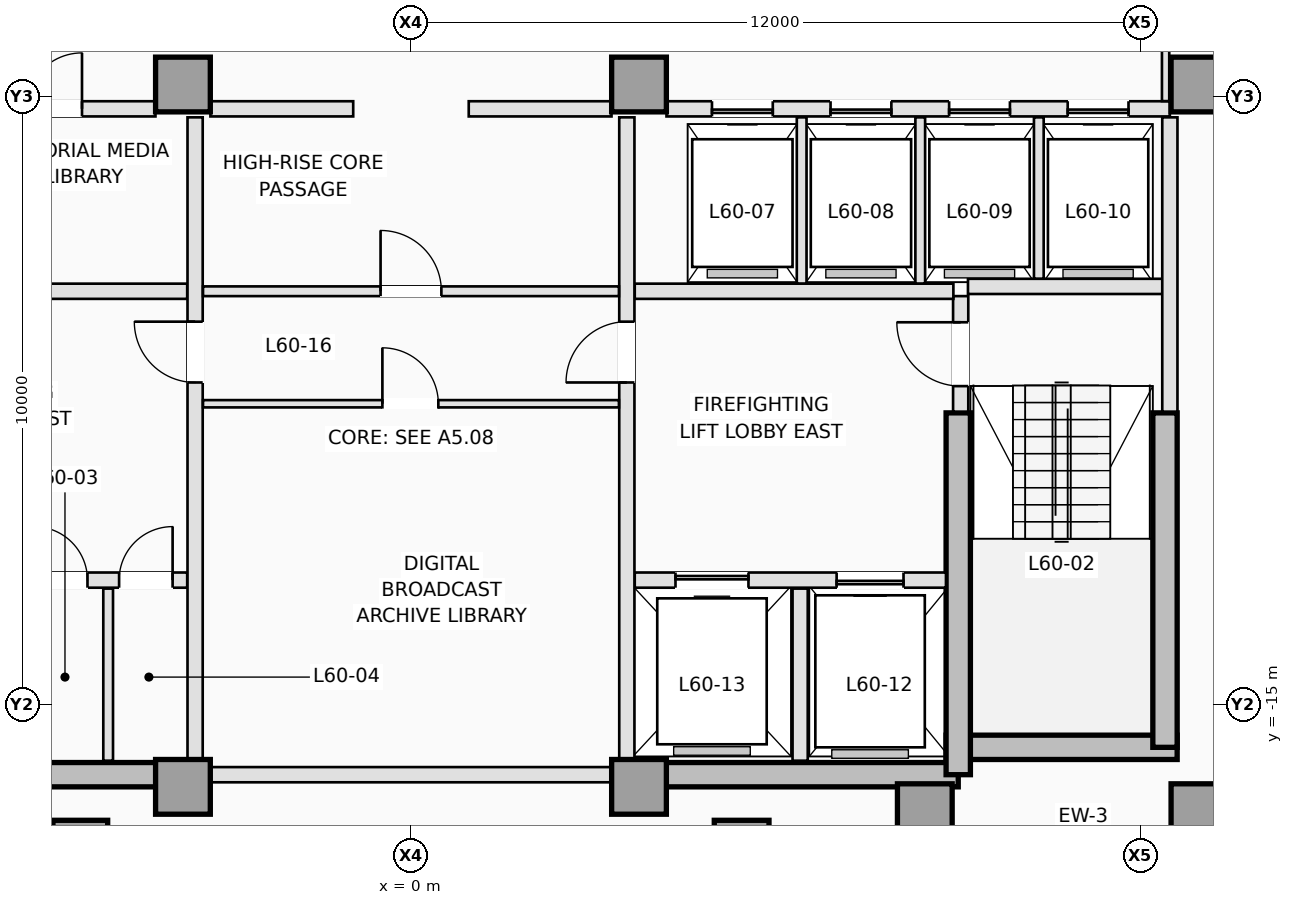
"""IFC4 building model, lengths in metres.
Left out: names, types, materials, properties, quantities, classifications, styles, units other than length and angle.
Written with IfcOpenShell. Run it as: python <this file> out.ifc"""

import sys

from ifc_helpers import new_model, si_unit, direction, frame, frame_2d, origin, origin_2d, place, context, subcontext, project, spatial, rectangle, extrude, element, fill, save


model = new_model("IFC4")
c1 = context("Model", 3, precision=1e-05, world=origin(), true_north=direction((0.0, 1.0)))
c2 = subcontext(c1, "Body", "Model", "MODEL_VIEW")
j1 = project(units=[si_unit("LENGTHUNIT", "METRE"), si_unit("PLANEANGLEUNIT", "RADIAN")], contexts=[c1])
p1 = place(None, origin())
s1 = spatial("IfcSite", under=j1, at=p1, CompositionType="ELEMENT")
p2 = place(p1, origin())
s2 = spatial("IfcBuilding", under=s1, at=p2, CompositionType="ELEMENT")
p3 = place(p2, frame((0.0, 0.0, 218.4)))
s3 = spatial("IfcBuildingStorey", under=s2, at=p3, CompositionType="ELEMENT", Elevation=218.4)
for number, where, z_axis, x_axis in (
    (1, (-9.0, -16.15, 0.0), (0.0, 0.0, 1.0), (1.0, 0.0, 0.0)),
    (2, (3.75, -16.15, 0.0), (0.0, 0.0, 1.0), (1.0, 0.0, 0.0)),
):
    element("IfcWall", number, at=place(p3, frame(where, z_axis=z_axis, x_axis=x_axis)), inside=s3, PredefinedType="SHEAR", context=c2, shape_type="SweptSolid", body=[
        extrude(rectangle(XDim=5.25, YDim=0.4, at=frame_2d((2.625, 0.0))), origin(), (0.0, 0.0, 1.0), 3.5),
    ])
p4 = place(p3, frame((8.8, -15.7, 0.0), z_axis=(0.0, 0.0, 1.0), x_axis=(1.0, 0.0, 0.0)))
e3 = element("IfcWall", 3, at=p4, inside=s3, PredefinedType="SHEAR", context=c2, shape_type="SweptSolid", body=[
    extrude(rectangle(XDim=3.8, YDim=0.4, at=frame_2d((1.9, 0.0))), origin(), (0.0, 0.0, 1.0), 3.5),
])
p5 = place(p3, frame((12.4, -15.7, 0.0), z_axis=(0.0, 0.0, 1.0), x_axis=(0.0, 1.0, 0.0)))
e4 = element("IfcWall", 4, at=p5, inside=s3, PredefinedType="SHEAR", context=c2, shape_type="SweptSolid", body=[
    extrude(rectangle(XDim=5.5, YDim=0.4, at=frame_2d((2.75, 0.0))), origin(), (0.0, 0.0, 1.0), 3.5),
])
p6 = place(p3, frame((9.0, -16.15, 0.0), z_axis=(0.0, 0.0, 1.0), x_axis=(0.0, 1.0, 0.0)))
e5 = element("IfcWall", 5, at=p6, inside=s3, PredefinedType="SHEAR", context=c2, shape_type="SweptSolid", body=[
    extrude(rectangle(XDim=5.95, YDim=0.4, at=frame_2d((2.975, 0.0))), origin(), (0.0, 0.0, 1.0), 3.5),
])
for number, where, z_axis, x_axis in (
    (6, (-3.75, -16.35, 0.0), (0.0, 0.0, 1.0), (1.0, 0.0, 0.0)),
    (7, (3.75, -16.35, 0.0), (0.0, 0.0, 1.0), (1.0, 0.0, 0.0)),
    (8, (8.45, -16.75, 0.0), (0.0, 0.0, 1.0), (1.0, 0.0, 0.0)),
    (9, (12.95, -16.75, 0.0), (0.0, 0.0, 1.0), (1.0, 0.0, 0.0)),
    (10, (-3.75, -4.8, 0.0), (0.0, 0.0, 1.0), (1.0, 0.0, 0.0)),
    (11, (3.75, -4.8, 0.0), (0.0, 0.0, 1.0), (1.0, 0.0, 0.0)),
    (12, (12.95, -4.8, 0.0), (0.0, 0.0, 1.0), (1.0, 0.0, 0.0)),
    (13, (-5.438, -17.35, 0.0), (0.0, 0.0, 1.0), (0.0, 1.0, 0.0)),
    (14, (5.438, -17.35, 0.0), (0.0, 0.0, 1.0), (0.0, 1.0, 0.0)),
):
    element("IfcColumn", number, at=place(p3, frame(where, z_axis=z_axis, x_axis=x_axis)), inside=s3, PredefinedType="COLUMN", context=c2, shape_type="SweptSolid", body=[
        extrude(rectangle(XDim=0.9, YDim=0.9, at=origin_2d()), origin(), (0.0, 0.0, 1.0), 3.5),
    ])
p7 = place(p3, frame((9.04, -10.18, 0.0), z_axis=(0.0, 0.0, 1.0), x_axis=(0.0, 1.0, 0.0)))
e15 = element("IfcWall", 15, at=p7, inside=s3, PredefinedType="PARTITIONING", context=c2, shape_type="SweptSolid", body=[
    extrude(rectangle(XDim=1.9, YDim=0.25, at=frame_2d((0.95, 0.0))), origin(), (0.0, 0.0, 1.0), 3.25),
])
p8 = place(p7, frame((0.42, 0.0, 0.0)))
e16 = element("IfcOpeningElement", 16, at=p8, cuts=e15, PredefinedType="OPENING", context=c2, shape_type="SweptSolid", body=[
    extrude(rectangle(XDim=1.05, YDim=2.15, at=frame_2d((0.525, 1.075))), frame((0.0, 0.135, 0.0), z_axis=(0.0, -1.0, 0.0), x_axis=(1.0, 0.0, 0.0)), (0.0, 0.0, 1.0), 0.27),
])
p9 = place(p3, frame((9.16, -8.12, 0.0), z_axis=(0.0, 0.0, 1.0), x_axis=(1.0, 0.0, 0.0)))
e17 = element("IfcWall", 17, at=p9, inside=s3, PredefinedType="PARTITIONING", context=c2, shape_type="SweptSolid", body=[
    extrude(rectangle(XDim=3.22, YDim=0.25, at=frame_2d((1.61, 0.0))), origin(), (0.0, 0.0, 1.0), 3.25),
])
p10 = place(p3, frame((12.48, -10.18, 0.0), z_axis=(0.0, 0.0, 1.0), x_axis=(0.0, 1.0, 0.0)))
e18 = element("IfcWall", 18, at=p10, inside=s3, PredefinedType="PARTITIONING", context=c2, shape_type="SweptSolid", body=[
    extrude(rectangle(XDim=4.84, YDim=0.25, at=frame_2d((2.42, 0.0))), origin(), (0.0, 0.0, 1.0), 3.25),
])
p11 = place(p3, frame((-8.798, -12.95, 0.0), z_axis=(0.0, 0.0, 1.0), x_axis=(1.0, 0.0, 0.0)))
e19 = element("IfcWall", 19, at=p11, inside=s3, PredefinedType="PARTITIONING", context=c2, shape_type="SweptSolid", body=[
    extrude(rectangle(XDim=5.118, YDim=0.25, at=frame_2d((2.559, 0.0))), origin(), (0.0, 0.0, 1.0), 3.25),
])
p12 = place(p11, frame((0.698, 0.0, 0.0)))
e20 = element("IfcOpeningElement", 20, at=p12, cuts=e19, PredefinedType="OPENING", context=c2, shape_type="SweptSolid", body=[
    extrude(rectangle(XDim=1.1, YDim=2.15, at=frame_2d((0.55, 1.075))), frame((0.0, 0.135, 0.0), z_axis=(0.0, -1.0, 0.0), x_axis=(1.0, 0.0, 0.0)), (0.0, 0.0, 1.0), 0.27),
])
p13 = place(p11, frame((2.598, 0.0, 0.0)))
e21 = element("IfcOpeningElement", 21, at=p13, cuts=e19, PredefinedType="OPENING", context=c2, shape_type="SweptSolid", body=[
    extrude(rectangle(XDim=0.88, YDim=2.1, at=frame_2d((0.44, 1.05))), frame((0.0, 0.135, 0.0), z_axis=(0.0, -1.0, 0.0), x_axis=(1.0, 0.0, 0.0)), (0.0, 0.0, 1.0), 0.27),
])
p14 = place(p11, frame((3.998, 0.0, 0.0)))
e22 = element("IfcOpeningElement", 22, at=p14, cuts=e19, PredefinedType="OPENING", context=c2, shape_type="SweptSolid", body=[
    extrude(rectangle(XDim=0.88, YDim=2.1, at=frame_2d((0.44, 1.05))), frame((0.0, 0.135, 0.0), z_axis=(0.0, -1.0, 0.0), x_axis=(1.0, 0.0, 0.0)), (0.0, 0.0, 1.0), 0.27),
])
p15 = place(p3, frame((3.68, -12.95, 0.0), z_axis=(0.0, 0.0, 1.0), x_axis=(1.0, 0.0, 0.0)))
e23 = element("IfcWall", 23, at=p15, inside=s3, PredefinedType="PARTITIONING", context=c2, shape_type="SweptSolid", body=[
    extrude(rectangle(XDim=5.118, YDim=0.25, at=frame_2d((2.559, 0.0))), origin(), (0.0, 0.0, 1.0), 3.25),
])
p16 = place(p15, frame((3.32, 0.0, 0.0)))
e24 = element("IfcOpeningElement", 24, at=p16, cuts=e23, PredefinedType="OPENING", context=c2, shape_type="SweptSolid", body=[
    extrude(rectangle(XDim=1.1, YDim=2.15, at=frame_2d((0.55, 1.075))), frame((0.0, 0.135, 0.0), z_axis=(0.0, -1.0, 0.0), x_axis=(1.0, 0.0, 0.0)), (0.0, 0.0, 1.0), 0.27),
])
p17 = place(p15, frame((0.67, 0.0, 0.0)))
e25 = element("IfcOpeningElement", 25, at=p17, cuts=e23, PredefinedType="OPENING", context=c2, shape_type="SweptSolid", body=[
    extrude(rectangle(XDim=1.2, YDim=2.15, at=frame_2d((0.6, 1.075))), frame((0.0, 0.135, 0.0), z_axis=(0.0, -1.0, 0.0), x_axis=(1.0, 0.0, 0.0)), (0.0, 0.0, 1.0), 0.27),
])
p18 = place(p3, frame((-4.98, -15.92, 0.0), z_axis=(0.0, 0.0, 1.0), x_axis=(0.0, 1.0, 0.0)))
e26 = element("IfcWall", 26, at=p18, inside=s3, PredefinedType="PARTITIONING", context=c2, shape_type="SweptSolid", body=[
    extrude(rectangle(XDim=2.83, YDim=0.16, at=frame_2d((1.415, 0.0))), origin(), (0.0, 0.0, 1.0), 3.25),
])
p19 = place(p3, frame((6.4, -15.92, 0.0), z_axis=(0.0, 0.0, 1.0), x_axis=(0.0, 1.0, 0.0)))
e27 = element("IfcWall", 27, at=p19, inside=s3, PredefinedType="PARTITIONING", context=c2, shape_type="SweptSolid", body=[
    extrude(rectangle(XDim=2.83, YDim=0.25, at=frame_2d((1.415, 0.0))), origin(), (0.0, 0.0, 1.0), 3.25),
])
for number, where, z_axis, x_axis in (
    (28, (-8.92, -8.2, 0.0), (0.0, 0.0, 1.0), (1.0, 0.0, 0.0)),
    (29, (3.68, -8.2, 0.0), (0.0, 0.0, 1.0), (1.0, 0.0, 0.0)),
):
    element("IfcWall", number, at=place(p3, frame(where, z_axis=z_axis, x_axis=x_axis)), inside=s3, PredefinedType="PARTITIONING", context=c2, shape_type="SweptSolid", body=[
        extrude(rectangle(XDim=5.24, YDim=0.25, at=frame_2d((2.62, 0.0))), origin(), (0.0, 0.0, 1.0), 3.25),
    ])
p20 = place(p3, frame((-3.55, -15.898, 0.0), z_axis=(0.0, 0.0, 1.0), x_axis=(0.0, 1.0, 0.0)))
e30 = element("IfcWall", 30, at=p20, inside=s3, PredefinedType="PARTITIONING", context=c2, shape_type="SweptSolid", body=[
    extrude(rectangle(XDim=10.558, YDim=0.25, at=frame_2d((5.279, 0.0))), origin(), (0.0, 0.0, 1.0), 3.25),
])
p21 = place(p20, frame((6.198, 0.0, 0.0)))
e31 = element("IfcOpeningElement", 31, at=p21, cuts=e30, PredefinedType="OPENING", context=c2, shape_type="SweptSolid", body=[
    extrude(rectangle(XDim=1.0, YDim=2.15, at=frame_2d((0.5, 1.075))), frame((0.0, 0.135, 0.0), z_axis=(0.0, -1.0, 0.0), x_axis=(1.0, 0.0, 0.0)), (0.0, 0.0, 1.0), 0.27),
])
p22 = place(p3, frame((3.55, -15.898, 0.0), z_axis=(0.0, 0.0, 1.0), x_axis=(0.0, 1.0, 0.0)))
e32 = element("IfcWall", 32, at=p22, inside=s3, PredefinedType="PARTITIONING", context=c2, shape_type="SweptSolid", body=[
    extrude(rectangle(XDim=10.558, YDim=0.25, at=frame_2d((5.279, 0.0))), origin(), (0.0, 0.0, 1.0), 3.25),
])
p23 = place(p22, frame((6.198, 0.0, 0.0)))
e33 = element("IfcOpeningElement", 33, at=p23, cuts=e32, PredefinedType="OPENING", context=c2, shape_type="SweptSolid", body=[
    extrude(rectangle(XDim=1.0, YDim=2.15, at=frame_2d((0.5, 1.075))), frame((0.0, 0.135, 0.0), z_axis=(0.0, -1.0, 0.0), x_axis=(1.0, 0.0, 0.0)), (0.0, 0.0, 1.0), 0.27),
])
p24 = place(p3, frame((-12.48, -5.2, 0.0), z_axis=(0.0, 0.0, 1.0), x_axis=(1.0, 0.0, 0.0)))
e34 = element("IfcWall", 34, at=p24, inside=s3, PredefinedType="PARTITIONING", context=c2, shape_type="SweptSolid", body=[
    extrude(rectangle(XDim=8.278, YDim=0.25, at=frame_2d((4.139, 0.0))), origin(), (0.0, 0.0, 1.0), 3.25),
])
p25 = place(p24, frame((3.05, 0.0, 0.0)))
e35 = element("IfcOpeningElement", 35, at=p25, cuts=e34, PredefinedType="OPENING", context=c2, shape_type="SweptSolid", body=[
    extrude(rectangle(XDim=0.92, YDim=2.12, at=frame_2d((0.46, 1.06))), frame((0.0, 0.135, 0.0), z_axis=(0.0, -1.0, 0.0), x_axis=(1.0, 0.0, 0.0)), (0.0, 0.0, 1.0), 0.27),
])
p26 = place(p24, frame((6.15, 0.0, 0.0)))
e36 = element("IfcOpeningElement", 36, at=p26, cuts=e34, PredefinedType="OPENING", context=c2, shape_type="SweptSolid", body=[
    extrude(rectangle(XDim=0.92, YDim=2.12, at=frame_2d((0.46, 1.06))), frame((0.0, 0.135, 0.0), z_axis=(0.0, -1.0, 0.0), x_axis=(1.0, 0.0, 0.0)), (0.0, 0.0, 1.0), 0.27),
])
p27 = place(p3, frame((4.202, -5.2, 0.0), z_axis=(0.0, 0.0, 1.0), x_axis=(1.0, 0.0, 0.0)))
e37 = element("IfcWall", 37, at=p27, inside=s3, PredefinedType="PARTITIONING", context=c2, shape_type="SweptSolid", body=[
    extrude(rectangle(XDim=8.278, YDim=0.25, at=frame_2d((4.139, 0.0))), origin(), (0.0, 0.0, 1.0), 3.25),
])
p28 = place(p27, frame((0.748, 0.0, 0.0)))
e38 = element("IfcOpeningElement", 38, at=p28, cuts=e37, PredefinedType="OPENING", context=c2, shape_type="SweptSolid", body=[
    extrude(rectangle(XDim=1.0, YDim=2.15, at=frame_2d((0.5, 1.075))), frame((0.0, 0.135, 0.0), z_axis=(0.0, -1.0, 0.0), x_axis=(1.0, 0.0, 0.0)), (0.0, 0.0, 1.0), 0.27),
])
p29 = place(p27, frame((2.698, 0.0, 0.0)))
e39 = element("IfcOpeningElement", 39, at=p29, cuts=e37, PredefinedType="OPENING", context=c2, shape_type="SweptSolid", body=[
    extrude(rectangle(XDim=1.0, YDim=2.15, at=frame_2d((0.5, 1.075))), frame((0.0, 0.135, 0.0), z_axis=(0.0, -1.0, 0.0), x_axis=(1.0, 0.0, 0.0)), (0.0, 0.0, 1.0), 0.27),
])
p30 = place(p27, frame((4.648, 0.0, 0.0)))
e40 = element("IfcOpeningElement", 40, at=p30, cuts=e37, PredefinedType="OPENING", context=c2, shape_type="SweptSolid", body=[
    extrude(rectangle(XDim=1.0, YDim=2.15, at=frame_2d((0.5, 1.075))), frame((0.0, 0.135, 0.0), z_axis=(0.0, -1.0, 0.0), x_axis=(1.0, 0.0, 0.0)), (0.0, 0.0, 1.0), 0.27),
])
p31 = place(p27, frame((6.598, 0.0, 0.0)))
e41 = element("IfcOpeningElement", 41, at=p31, cuts=e37, PredefinedType="OPENING", context=c2, shape_type="SweptSolid", body=[
    extrude(rectangle(XDim=1.0, YDim=2.15, at=frame_2d((0.5, 1.075))), frame((0.0, 0.135, 0.0), z_axis=(0.0, -1.0, 0.0), x_axis=(1.0, 0.0, 0.0)), (0.0, 0.0, 1.0), 0.27),
])
for number, where, z_axis, x_axis in (
    (42, (-3.298, -5.2, 0.0), (0.0, 0.0, 1.0), (1.0, 0.0, 0.0)),
    (43, (0.95, -5.2, 0.0), (0.0, 0.0, 1.0), (1.0, 0.0, 0.0)),
):
    element("IfcWall", number, at=place(p3, frame(where, z_axis=z_axis, x_axis=x_axis)), inside=s3, PredefinedType="PARTITIONING", context=c2, shape_type="SweptSolid", body=[
        extrude(rectangle(XDim=2.348, YDim=0.25, at=frame_2d((1.174, 0.0))), origin(), (0.0, 0.0, 1.0), 3.25),
    ])
for number, where, z_axis, x_axis in (
    (44, (6.425, -8.073, 0.0), (0.0, 0.0, 1.0), (0.0, 1.0, 0.0)),
    (45, (8.375, -8.073, 0.0), (0.0, 0.0, 1.0), (0.0, 1.0, 0.0)),
):
    element("IfcWall", number, at=place(p3, frame(where, z_axis=z_axis, x_axis=x_axis)), inside=s3, PredefinedType="PARTITIONING", context=c2, shape_type="SweptSolid", body=[
        extrude(rectangle(XDim=2.733, YDim=0.16, at=frame_2d((1.366, 0.0))), origin(), (0.0, 0.0, 1.0), 3.25),
    ])
p32 = place(p3, frame((10.325, -7.993, 0.0), z_axis=(0.0, 0.0, 1.0), x_axis=(0.0, 1.0, 0.0)))
e46 = element("IfcWall", 46, at=p32, inside=s3, PredefinedType="PARTITIONING", context=c2, shape_type="SweptSolid", body=[
    extrude(rectangle(XDim=2.653, YDim=0.16, at=frame_2d((1.326, 0.0))), origin(), (0.0, 0.0, 1.0), 3.25),
])
p33 = place(p3, frame((-3.298, -16.15, 0.0), z_axis=(0.0, 0.0, 1.0), x_axis=(1.0, 0.0, 0.0)))
e47 = element("IfcWall", 47, at=p33, inside=s3, PredefinedType="PARTITIONING", context=c2, shape_type="SweptSolid", body=[
    extrude(rectangle(XDim=6.596, YDim=0.25, at=frame_2d((3.298, 0.0))), origin(), (0.0, 0.0, 1.0), 2.45),
])
p34 = place(p3, frame((-3.42, -8.2, 0.0), z_axis=(0.0, 0.0, 1.0), x_axis=(1.0, 0.0, 0.0)))
e48 = element("IfcWall", 48, at=p34, inside=s3, PredefinedType="PARTITIONING", context=c2, shape_type="SweptSolid", body=[
    extrude(rectangle(XDim=6.84, YDim=0.16, at=frame_2d((3.42, 0.0))), origin(), (0.0, 0.0, 1.0), 3.25),
])
p35 = place(p34, frame((2.92, 0.0, 0.0)))
e49 = element("IfcOpeningElement", 49, at=p35, cuts=e48, PredefinedType="OPENING", context=c2, shape_type="SweptSolid", body=[
    extrude(rectangle(XDim=1.0, YDim=2.15, at=frame_2d((0.5, 1.075))), frame((0.0, 0.09, 0.0), z_axis=(0.0, -1.0, 0.0), x_axis=(1.0, 0.0, 0.0)), (0.0, 0.0, 1.0), 0.18),
])
p36 = place(p3, frame((-3.42, -10.05, 0.0), z_axis=(0.0, 0.0, 1.0), x_axis=(1.0, 0.0, 0.0)))
e50 = element("IfcWall", 50, at=p36, inside=s3, PredefinedType="PARTITIONING", context=c2, shape_type="SweptSolid", body=[
    extrude(rectangle(XDim=6.84, YDim=0.12, at=frame_2d((3.42, 0.0))), origin(), (0.0, 0.0, 1.0), 3.25),
])
p37 = place(p36, frame((2.95, 0.0, 0.0)))
e51 = element("IfcOpeningElement", 51, at=p37, cuts=e50, PredefinedType="OPENING", context=c2, shape_type="SweptSolid", body=[
    extrude(rectangle(XDim=0.92, YDim=2.12, at=frame_2d((0.46, 1.06))), frame((0.0, 0.07, 0.0), z_axis=(0.0, -1.0, 0.0), x_axis=(1.0, 0.0, 0.0)), (0.0, 0.0, 1.0), 0.14),
])
p38 = place(p3, frame((12.41, -2.462, 0.0), z_axis=(0.0, 0.0, 1.0), x_axis=(0.0, -1.0, 0.0)))
e52 = element("IfcWall", 52, at=p38, inside=s3, PredefinedType="PARTITIONING", context=c2, shape_type="SweptSolid", body=[
    extrude(rectangle(XDim=2.611, YDim=0.12, at=frame_2d((1.306, 0.0))), origin(), (0.0, 0.0, 1.0), 3.25),
])
p39 = place(p28, origin())
e53 = element("IfcDoor", 53, at=p39, inside=s3, OperationType="SLIDING_TO_RIGHT", PredefinedType="DOOR", context=c2, shape_type="SweptSolid", body=[
    extrude(rectangle(XDim=1.0, YDim=2.15, at=frame_2d((0.5, 1.075))), frame((0.0, 0.025, 0.0), z_axis=(0.0, -1.0, 0.0), x_axis=(1.0, 0.0, 0.0)), (0.0, 0.0, 1.0), 0.05),
])
fill(e38, e53)
p40 = place(p29, origin())
e54 = element("IfcDoor", 54, at=p40, inside=s3, OperationType="SLIDING_TO_RIGHT", PredefinedType="DOOR", context=c2, shape_type="SweptSolid", body=[
    extrude(rectangle(XDim=1.0, YDim=2.15, at=frame_2d((0.5, 1.075))), frame((0.0, 0.025, 0.0), z_axis=(0.0, -1.0, 0.0), x_axis=(1.0, 0.0, 0.0)), (0.0, 0.0, 1.0), 0.05),
])
fill(e39, e54)
p41 = place(p30, origin())
e55 = element("IfcDoor", 55, at=p41, inside=s3, OperationType="SLIDING_TO_RIGHT", PredefinedType="DOOR", context=c2, shape_type="SweptSolid", body=[
    extrude(rectangle(XDim=1.0, YDim=2.15, at=frame_2d((0.5, 1.075))), frame((0.0, 0.025, 0.0), z_axis=(0.0, -1.0, 0.0), x_axis=(1.0, 0.0, 0.0)), (0.0, 0.0, 1.0), 0.05),
])
fill(e40, e55)
p42 = place(p31, origin())
e56 = element("IfcDoor", 56, at=p42, inside=s3, OperationType="SLIDING_TO_RIGHT", PredefinedType="DOOR", context=c2, shape_type="SweptSolid", body=[
    extrude(rectangle(XDim=1.0, YDim=2.15, at=frame_2d((0.5, 1.075))), frame((0.0, 0.025, 0.0), z_axis=(0.0, -1.0, 0.0), x_axis=(1.0, 0.0, 0.0)), (0.0, 0.0, 1.0), 0.05),
])
fill(e41, e56)
p43 = place(p16, origin())
e57 = element("IfcDoor", 57, at=p43, inside=s3, OperationType="SLIDING_TO_RIGHT", PredefinedType="DOOR", context=c2, shape_type="SweptSolid", body=[
    extrude(rectangle(XDim=1.1, YDim=2.15, at=frame_2d((0.55, 1.075))), frame((0.0, 0.025, 0.0), z_axis=(0.0, -1.0, 0.0), x_axis=(1.0, 0.0, 0.0)), (0.0, 0.0, 1.0), 0.05),
])
fill(e24, e57)
p44 = place(p17, origin())
e58 = element("IfcDoor", 58, at=p44, inside=s3, OperationType="SLIDING_TO_LEFT", PredefinedType="DOOR", context=c2, shape_type="SweptSolid", body=[
    extrude(rectangle(XDim=1.2, YDim=2.15, at=frame_2d((0.6, 1.075))), frame((0.0, 0.025, 0.0), z_axis=(0.0, -1.0, 0.0), x_axis=(1.0, 0.0, 0.0)), (0.0, 0.0, 1.0), 0.05),
])
fill(e25, e58)
p45 = place(p8, origin())
e59 = element("IfcDoor", 59, at=p45, inside=s3, OperationType="SINGLE_SWING_RIGHT", PredefinedType="DOOR", context=c2, shape_type="SweptSolid", body=[
    extrude(rectangle(XDim=1.05, YDim=2.15, at=frame_2d((0.525, 1.075))), frame((0.0, 0.025, 0.0), z_axis=(0.0, -1.0, 0.0), x_axis=(1.0, 0.0, 0.0)), (0.0, 0.0, 1.0), 0.05),
])
fill(e16, e59)
p46 = place(p13, origin())
e60 = element("IfcDoor", 60, at=p46, inside=s3, OperationType="SINGLE_SWING_LEFT", PredefinedType="TRAPDOOR", context=c2, shape_type="SweptSolid", body=[
    extrude(rectangle(XDim=0.88, YDim=2.1, at=frame_2d((0.44, 1.05))), frame((0.0, 0.025, 0.0), z_axis=(0.0, -1.0, 0.0), x_axis=(1.0, 0.0, 0.0)), (0.0, 0.0, 1.0), 0.05),
])
fill(e21, e60)
p47 = place(p14, origin())
e61 = element("IfcDoor", 61, at=p47, inside=s3, OperationType="SINGLE_SWING_RIGHT", PredefinedType="TRAPDOOR", context=c2, shape_type="SweptSolid", body=[
    extrude(rectangle(XDim=0.88, YDim=2.1, at=frame_2d((0.44, 1.05))), frame((0.0, 0.025, 0.0), z_axis=(0.0, -1.0, 0.0), x_axis=(1.0, 0.0, 0.0)), (0.0, 0.0, 1.0), 0.05),
])
fill(e22, e61)
p48 = place(p21, origin())
e62 = element("IfcDoor", 62, at=p48, inside=s3, OperationType="SINGLE_SWING_RIGHT", PredefinedType="DOOR", context=c2, shape_type="SweptSolid", body=[
    extrude(rectangle(XDim=1.0, YDim=2.15, at=frame_2d((0.5, 1.075))), frame((0.0, 0.025, 0.0), z_axis=(0.0, -1.0, 0.0), x_axis=(1.0, 0.0, 0.0)), (0.0, 0.0, 1.0), 0.05),
])
fill(e31, e62)
p49 = place(p23, origin())
e63 = element("IfcDoor", 63, at=p49, inside=s3, OperationType="SINGLE_SWING_LEFT", PredefinedType="DOOR", context=c2, shape_type="SweptSolid", body=[
    extrude(rectangle(XDim=1.0, YDim=2.15, at=frame_2d((0.5, 1.075))), frame((0.0, 0.025, 0.0), z_axis=(0.0, -1.0, 0.0), x_axis=(1.0, 0.0, 0.0)), (0.0, 0.0, 1.0), 0.05),
])
fill(e33, e63)
p50 = place(p26, origin())
e64 = element("IfcDoor", 64, at=p50, inside=s3, OperationType="SINGLE_SWING_RIGHT", PredefinedType="DOOR", context=c2, shape_type="SweptSolid", body=[
    extrude(rectangle(XDim=0.92, YDim=2.12, at=frame_2d((0.46, 1.06))), frame((0.0, 0.025, 0.0), z_axis=(0.0, -1.0, 0.0), x_axis=(1.0, 0.0, 0.0)), (0.0, 0.0, 1.0), 0.05),
])
fill(e36, e64)
p51 = place(p35, origin())
e65 = element("IfcDoor", 65, at=p51, inside=s3, OperationType="SINGLE_SWING_LEFT", PredefinedType="DOOR", context=c2, shape_type="SweptSolid", body=[
    extrude(rectangle(XDim=1.0, YDim=2.15, at=frame_2d((0.5, 1.075))), frame((0.0, 0.025, 0.0), z_axis=(0.0, -1.0, 0.0), x_axis=(1.0, 0.0, 0.0)), (0.0, 0.0, 1.0), 0.05),
])
fill(e49, e65)
p52 = place(p37, origin())
e66 = element("IfcDoor", 66, at=p52, inside=s3, OperationType="SINGLE_SWING_LEFT", PredefinedType="DOOR", context=c2, shape_type="SweptSolid", body=[
    extrude(rectangle(XDim=0.92, YDim=2.12, at=frame_2d((0.46, 1.06))), frame((0.0, 0.025, 0.0), z_axis=(0.0, -1.0, 0.0), x_axis=(1.0, 0.0, 0.0)), (0.0, 0.0, 1.0), 0.05),
])
fill(e51, e66)
save(model, sys.argv[1])
